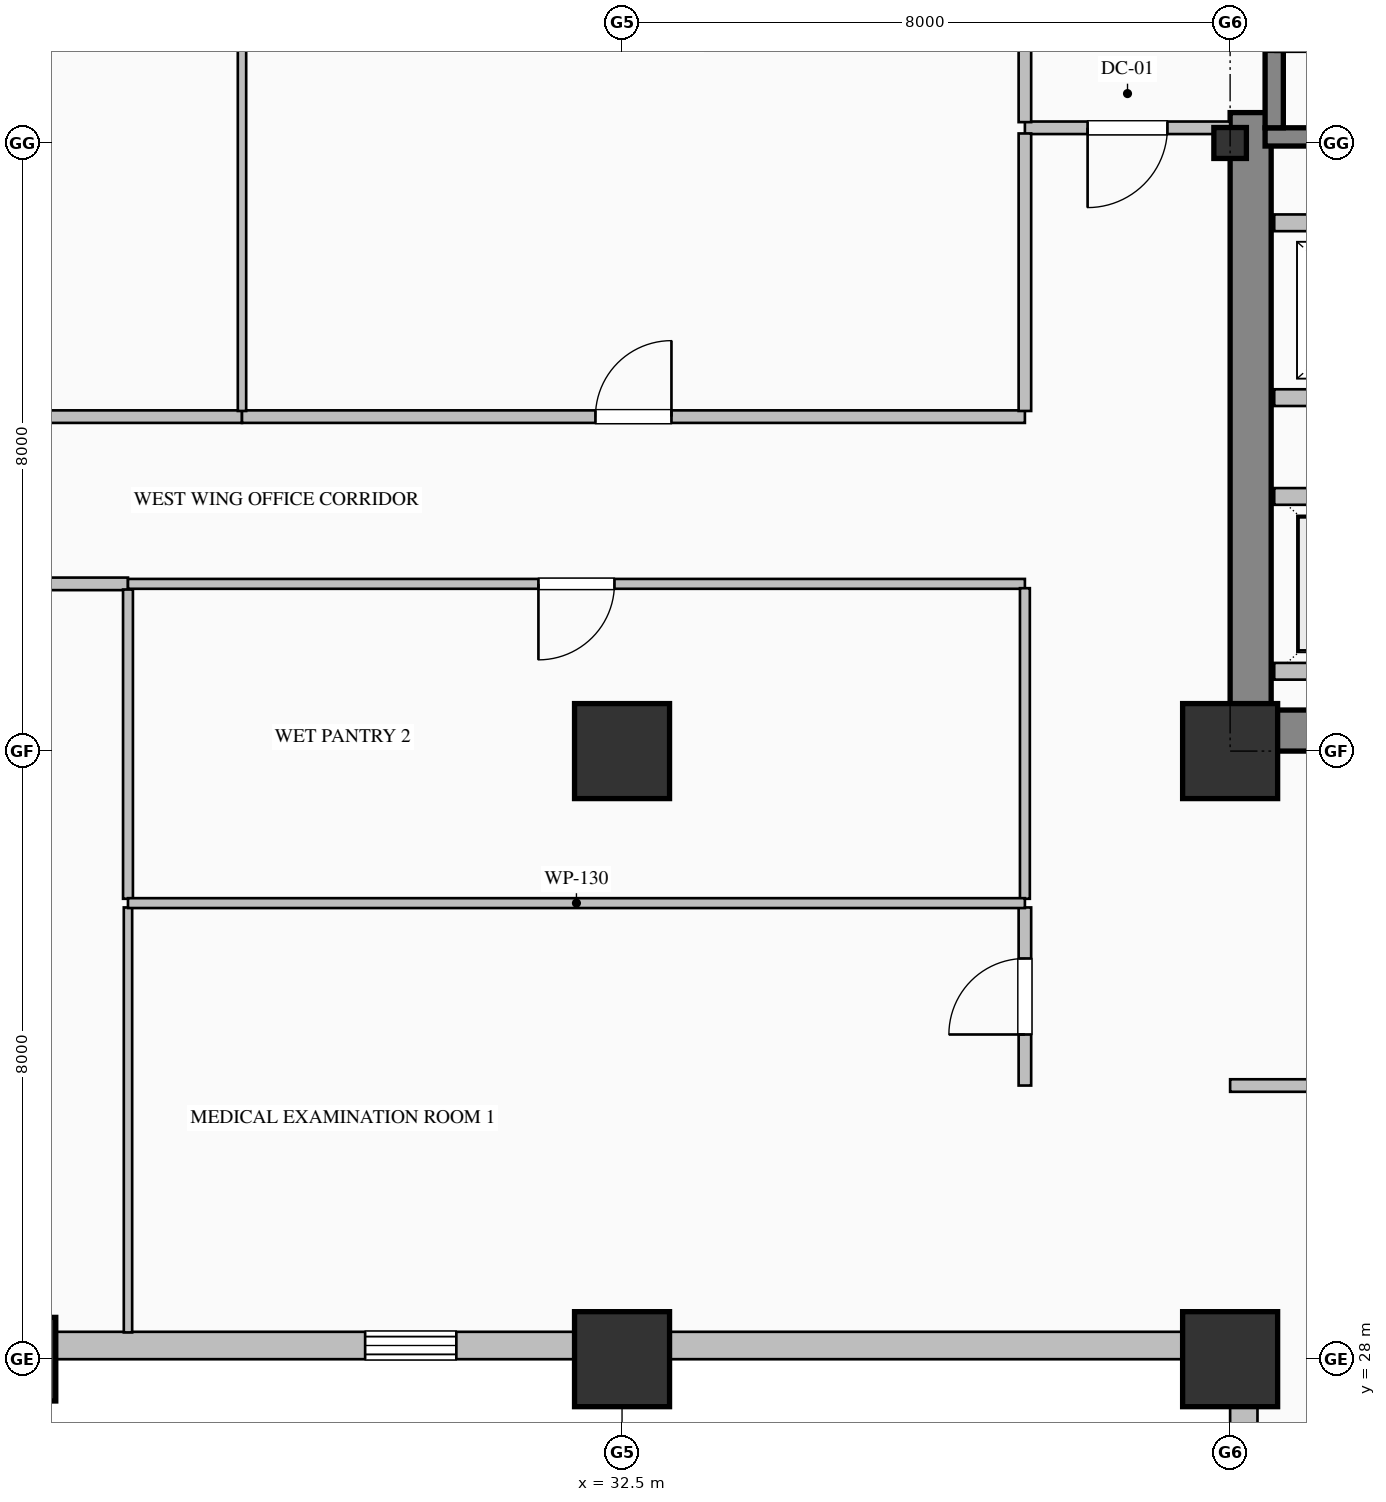
"""IFC4 building model, lengths in metres.
Left out: names, types, materials, properties, quantities, classifications, styles, units other than length and angle.
Written with IfcOpenShell. Run it as: python <this file> out.ifc"""

import sys

from ifc_helpers import new_model, si_unit, direction, frame, frame_2d, origin, origin_2d, place, context, subcontext, project, spatial, rectangle, hollow_rectangle, i_section, extrude, element, fill, save


model = new_model("IFC4")
c1 = context("Model", 3, precision=1e-05, world=origin(), true_north=direction((0.0, 1.0)))
c2 = subcontext(c1, "Body", "Model", "MODEL_VIEW")
j1 = project(units=[si_unit("LENGTHUNIT", "METRE"), si_unit("PLANEANGLEUNIT", "RADIAN")], contexts=[c1])
p1 = place(None, origin())
s1 = spatial("IfcSite", under=j1, at=p1, CompositionType="ELEMENT")
p2 = place(p1, origin())
s2 = spatial("IfcBuilding", under=s1, at=p2, CompositionType="ELEMENT")
p3 = place(p2, frame((0.0, 0.0, 80.2)))
s3 = spatial("IfcBuildingStorey", under=s2, at=p3, CompositionType="ELEMENT", Elevation=80.2)
p4 = place(p3, frame((40.77, 36.54, 0.0), z_axis=(0.0, 0.0, 1.0), x_axis=(0.0, 1.0, 0.0)))
e1 = element("IfcWall", 1, at=p4, inside=s3, PredefinedType="SHEAR", context=c2, shape_type="SweptSolid", body=[
    extrude(rectangle(XDim=7.86, YDim=0.54, at=frame_2d((3.93, 0.0))), origin(), (0.0, 0.0, 1.0), 3.75),
])
p5 = place(p3, frame((40.5, 36.27, 0.0), z_axis=(0.0, 0.0, 1.0), x_axis=(1.0, 0.0, 0.0)))
e2 = element("IfcWall", 2, at=p5, inside=s3, PredefinedType="SHEAR", context=c2, shape_type="SweptSolid", body=[
    extrude(rectangle(XDim=1.7, YDim=0.54, at=frame_2d((0.85, 0.0))), origin(), (0.0, 0.0, 1.0), 3.75),
])
p6 = place(p3, frame((24.5, 28.0, 0.0), z_axis=(0.0, 0.0, 1.0), x_axis=(1.0, 0.0, 0.0)))
e3 = element("IfcColumn", 3, at=p6, inside=s3, PredefinedType="COLUMN", context=c2, shape_type="SweptSolid", body=[
    extrude(hollow_rectangle(XDim=1.1, YDim=1.1, WallThickness=0.04, at=origin_2d()), origin(), (0.0, 0.0, 1.0), 4.0),
])
for number, where, z_axis, x_axis in (
    (4, (32.5, 28.0, 0.0), (0.0, 0.0, 1.0), (1.0, 0.0, 0.0)),
    (5, (32.5, 36.0, 0.0), (0.0, 0.0, 1.0), (1.0, 0.0, 0.0)),
    (6, (40.5, 28.0, 0.0), (0.0, 0.0, 1.0), (1.0, 0.0, 0.0)),
    (7, (40.5, 36.0, 0.0), (0.0, 0.0, 1.0), (1.0, 0.0, 0.0)),
):
    element("IfcColumn", number, at=place(p3, frame(where, z_axis=z_axis, x_axis=x_axis)), inside=s3, PredefinedType="COLUMN", context=c2, shape_type="SweptSolid", body=[
        extrude(hollow_rectangle(XDim=1.25, YDim=1.25, WallThickness=0.045, at=origin_2d()), origin(), (0.0, 0.0, 1.0), 4.0),
    ])
p7 = place(p3, frame((40.5, 44.0, 0.0), z_axis=(0.0, 0.0, 1.0), x_axis=(1.0, 0.0, 0.0)))
e8 = element("IfcColumn", 8, at=p7, inside=s3, PredefinedType="COLUMN", context=c2, shape_type="SweptSolid", body=[
    extrude(i_section(OverallWidth=0.407, OverallDepth=0.428, WebThickness=0.02, FlangeThickness=0.035, FilletRadius=0.022, at=origin_2d()), origin(), (0.0, 0.0, 1.0), 4.0),
])
p8 = place(p3, frame((40.68, 8.0, 0.0), z_axis=(0.0, 0.0, 1.0), x_axis=(0.0, 1.0, 0.0)))
e9 = element("IfcWall", 9, at=p8, inside=s3, PredefinedType="SOLIDWALL", context=c2, shape_type="SweptSolid", body=[
    extrude(rectangle(XDim=20.36, YDim=0.36, at=frame_2d((10.18, 0.0))), origin(), (0.0, 0.0, 1.0), 3.05),
])
p9 = place(p8, frame((6.6, 0.0, 0.7)))
e10 = element("IfcOpeningElement", 10, at=p9, cuts=e9, PredefinedType="OPENING", context=c2, shape_type="SweptSolid", body=[
    extrude(rectangle(XDim=1.2, YDim=1.85, at=frame_2d((0.6, 0.925))), frame((0.0, 0.19, 0.0), z_axis=(0.0, -1.0, 0.0), x_axis=(1.0, 0.0, 0.0)), (0.0, 0.0, 1.0), 0.38),
])
p10 = place(p8, frame((13.8, 0.0, 0.7)))
e11 = element("IfcOpeningElement", 11, at=p10, cuts=e9, PredefinedType="OPENING", context=c2, shape_type="SweptSolid", body=[
    extrude(rectangle(XDim=1.2, YDim=1.85, at=frame_2d((0.6, 0.925))), frame((0.0, 0.19, 0.0), z_axis=(0.0, -1.0, 0.0), x_axis=(1.0, 0.0, 0.0)), (0.0, 0.0, 1.0), 0.38),
])
p11 = place(p3, frame((40.52, 28.18, 0.0), z_axis=(0.0, 0.0, 1.0), x_axis=(-1.0, 0.0, 0.0)))
e12 = element("IfcWall", 12, at=p11, inside=s3, PredefinedType="SOLIDWALL", context=c2, shape_type="SweptSolid", body=[
    extrude(rectangle(XDim=36.52, YDim=0.36, at=frame_2d((18.26, 0.0))), origin(), (0.0, 0.0, 1.0), 3.05),
])
p12 = place(p11, frame((10.2, 0.0, 0.7)))
e13 = element("IfcOpeningElement", 13, at=p12, cuts=e12, PredefinedType="OPENING", context=c2, shape_type="SweptSolid", body=[
    extrude(rectangle(XDim=1.2, YDim=1.85, at=frame_2d((0.6, 0.925))), frame((0.0, 0.19, 0.0), z_axis=(0.0, -1.0, 0.0), x_axis=(1.0, 0.0, 0.0)), (0.0, 0.0, 1.0), 0.38),
])
p13 = place(p11, frame((17.4, 0.0, 0.7)))
e14 = element("IfcOpeningElement", 14, at=p13, cuts=e12, PredefinedType="OPENING", context=c2, shape_type="SweptSolid", body=[
    extrude(rectangle(XDim=1.2, YDim=1.85, at=frame_2d((0.6, 0.925))), frame((0.0, 0.19, 0.0), z_axis=(0.0, -1.0, 0.0), x_axis=(1.0, 0.0, 0.0)), (0.0, 0.0, 1.0), 0.38),
])
p14 = place(p11, frame((21.0, 0.0, 0.7)))
e15 = element("IfcOpeningElement", 15, at=p14, cuts=e12, PredefinedType="OPENING", context=c2, shape_type="SweptSolid", body=[
    extrude(rectangle(XDim=1.2, YDim=1.85, at=frame_2d((0.6, 0.925))), frame((0.0, 0.19, 0.0), z_axis=(0.0, -1.0, 0.0), x_axis=(1.0, 0.0, 0.0)), (0.0, 0.0, 1.0), 0.38),
])
p15 = place(p11, frame((28.2, 0.0, 0.7)))
e16 = element("IfcOpeningElement", 16, at=p15, cuts=e12, PredefinedType="OPENING", context=c2, shape_type="SweptSolid", body=[
    extrude(rectangle(XDim=1.2, YDim=1.85, at=frame_2d((0.6, 0.925))), frame((0.0, 0.19, 0.0), z_axis=(0.0, -1.0, 0.0), x_axis=(1.0, 0.0, 0.0)), (0.0, 0.0, 1.0), 0.38),
])
p16 = place(p3, frame((49.04, 44.08, 0.0), z_axis=(0.0, 0.0, 1.0), x_axis=(-1.0, 0.0, 0.0)))
e17 = element("IfcWall", 17, at=p16, inside=s3, PredefinedType="SOLIDWALL", context=c2, shape_type="SweptSolid", body=[
    extrude(rectangle(XDim=8.08, YDim=0.24, at=frame_2d((4.04, 0.0))), origin(), (0.0, 0.0, 1.0), 4.0),
])
p17 = place(p3, frame((41.08, 47.35, 0.0), z_axis=(0.0, 0.0, 1.0), x_axis=(0.0, -1.0, 0.0)))
e18 = element("IfcWall", 18, at=p17, inside=s3, PredefinedType="SOLIDWALL", context=c2, shape_type="SweptSolid", body=[
    extrude(rectangle(XDim=3.15, YDim=0.24, at=frame_2d((1.575, 0.0))), origin(), (0.0, 0.0, 1.0), 4.0),
])
p18 = place(p17, frame((1.0, 0.0, 0.0)))
e19 = element("IfcOpeningElement", 19, at=p18, cuts=e18, PredefinedType="OPENING", context=c2, shape_type="SweptSolid", body=[
    extrude(rectangle(XDim=1.15, YDim=2.2, at=frame_2d((0.575, 1.1))), frame((0.0, 0.13, 0.0), z_axis=(0.0, -1.0, 0.0), x_axis=(1.0, 0.0, 0.0)), (0.0, 0.0, 1.0), 0.26),
])
p19 = place(p3, frame((49.32, 37.05, 0.0), z_axis=(0.0, 0.0, 1.0), x_axis=(-1.0, 0.0, 0.0)))
e20 = element("IfcWall", 20, at=p19, inside=s3, PredefinedType="PARTITIONING", context=c2, shape_type="SweptSolid", body=[
    extrude(rectangle(XDim=8.24, YDim=0.22, at=frame_2d((4.12, 0.0))), origin(), (0.0, 0.0, 1.0), 3.75),
])
p20 = place(p19, frame((6.37, 0.0, 0.0)))
e21 = element("IfcOpeningElement", 21, at=p20, cuts=e20, PredefinedType="OPENING", context=c2, shape_type="SweptSolid", body=[
    extrude(rectangle(XDim=1.1, YDim=2.2, at=frame_2d((0.55, 1.1))), frame((0.0, 0.12, 0.0), z_axis=(0.0, -1.0, 0.0), x_axis=(1.0, 0.0, 0.0)), (0.0, 0.0, 1.0), 0.24),
])
p21 = place(p19, frame((3.57, 0.0, 0.0)))
e22 = element("IfcOpeningElement", 22, at=p21, cuts=e20, PredefinedType="OPENING", context=c2, shape_type="SweptSolid", body=[
    extrude(rectangle(XDim=1.1, YDim=2.2, at=frame_2d((0.55, 1.1))), frame((0.0, 0.12, 0.0), z_axis=(0.0, -1.0, 0.0), x_axis=(1.0, 0.0, 0.0)), (0.0, 0.0, 1.0), 0.24),
])
p22 = place(p19, frame((0.77, 0.0, 0.0)))
e23 = element("IfcOpeningElement", 23, at=p22, cuts=e20, PredefinedType="OPENING", context=c2, shape_type="SweptSolid", body=[
    extrude(rectangle(XDim=1.1, YDim=2.2, at=frame_2d((0.55, 1.1))), frame((0.0, 0.12, 0.0), z_axis=(0.0, -1.0, 0.0), x_axis=(1.0, 0.0, 0.0)), (0.0, 0.0, 1.0), 0.24),
])
for number, where, z_axis, x_axis in (
    (24, (41.08, 39.35, 0.0), (0.0, 0.0, 1.0), (1.0, 0.0, 0.0)),
    (25, (49.32, 40.65, 0.0), (0.0, 0.0, 1.0), (-1.0, 0.0, 0.0)),
    (26, (41.08, 42.95, 0.0), (0.0, 0.0, 1.0), (1.0, 0.0, 0.0)),
):
    element("IfcWall", number, at=place(p3, frame(where, z_axis=z_axis, x_axis=x_axis)), inside=s3, PredefinedType="PARTITIONING", context=c2, shape_type="SweptSolid", body=[
        extrude(rectangle(XDim=8.24, YDim=0.22, at=frame_2d((4.12, 0.0))), origin(), (0.0, 0.0, 1.0), 3.75),
    ])
p23 = place(p3, frame((40.5, 44.2, 0.0), z_axis=(0.0, 0.0, 1.0), x_axis=(-1.0, 0.0, 0.0)))
e27 = element("IfcWall", 27, at=p23, inside=s3, PredefinedType="PARTITIONING", context=c2, shape_type="SweptSolid", body=[
    extrude(rectangle(XDim=2.7, YDim=0.165, at=frame_2d((1.35, 0.0))), origin(), (0.0, 0.0, 1.0), 3.75),
])
p24 = place(p23, frame((0.825, 0.0, 0.0)))
e28 = element("IfcOpeningElement", 28, at=p24, cuts=e27, PredefinedType="OPENING", context=c2, shape_type="SweptSolid", body=[
    extrude(rectangle(XDim=1.05, YDim=2.15, at=frame_2d((0.525, 1.075))), frame((0.0, 0.093, 0.0), z_axis=(0.0, -1.0, 0.0), x_axis=(1.0, 0.0, 0.0)), (0.0, 0.0, 1.0), 0.185),
])
p25 = place(p3, frame((37.8, 44.274, 0.0), z_axis=(0.0, 0.0, 1.0), x_axis=(0.0, 1.0, 0.0)))
e29 = element("IfcWall", 29, at=p25, inside=s3, PredefinedType="PARTITIONING", context=c2, shape_type="SweptSolid", body=[
    extrude(rectangle(XDim=3.051, YDim=0.165, at=frame_2d((1.525, 0.0))), origin(), (0.0, 0.0, 1.0), 3.75),
])
p26 = place(p3, frame((20.5, 40.4, 0.0), z_axis=(0.0, 0.0, 1.0), x_axis=(1.0, 0.0, 0.0)))
e30 = element("IfcWall", 30, at=p26, inside=s3, PredefinedType="PARTITIONING", context=c2, shape_type="SweptSolid", body=[
    extrude(rectangle(XDim=7.0, YDim=0.165, at=frame_2d((3.5, 0.0))), origin(), (0.0, 0.0, 1.0), 3.75),
])
p27 = place(p26, frame((3.0, 0.0, 0.0)))
e31 = element("IfcOpeningElement", 31, at=p27, cuts=e30, PredefinedType="OPENING", context=c2, shape_type="SweptSolid", body=[
    extrude(rectangle(XDim=1.0, YDim=2.15, at=frame_2d((0.5, 1.075))), frame((0.0, 0.093, 0.0), z_axis=(0.0, -1.0, 0.0), x_axis=(1.0, 0.0, 0.0)), (0.0, 0.0, 1.0), 0.185),
])
p28 = place(p3, frame((27.5, 40.4, 0.0), z_axis=(0.0, 0.0, 1.0), x_axis=(1.0, 0.0, 0.0)))
e32 = element("IfcWall", 32, at=p28, inside=s3, PredefinedType="PARTITIONING", context=c2, shape_type="SweptSolid", body=[
    extrude(rectangle(XDim=10.3, YDim=0.165, at=frame_2d((5.15, 0.0))), origin(), (0.0, 0.0, 1.0), 3.75),
])
p29 = place(p28, frame((4.65, 0.0, 0.0)))
e33 = element("IfcOpeningElement", 33, at=p29, cuts=e32, PredefinedType="OPENING", context=c2, shape_type="SweptSolid", body=[
    extrude(rectangle(XDim=1.0, YDim=2.15, at=frame_2d((0.5, 1.075))), frame((0.0, 0.093, 0.0), z_axis=(0.0, -1.0, 0.0), x_axis=(1.0, 0.0, 0.0)), (0.0, 0.0, 1.0), 0.185),
])
p30 = place(p3, frame((26.0, 38.2, 0.0), z_axis=(0.0, 0.0, 1.0), x_axis=(-1.0, 0.0, 0.0)))
e34 = element("IfcWall", 34, at=p30, inside=s3, PredefinedType="PARTITIONING", context=c2, shape_type="SweptSolid", body=[
    extrude(rectangle(XDim=17.0, YDim=0.165, at=frame_2d((8.5, 0.0))), origin(), (0.0, 0.0, 1.0), 3.75),
])
p31 = place(p30, frame((7.5, 0.0, 0.0)))
e35 = element("IfcOpeningElement", 35, at=p31, cuts=e34, PredefinedType="OPENING", context=c2, shape_type="SweptSolid", body=[
    extrude(rectangle(XDim=2.0, YDim=2.4, at=frame_2d((1.0, 1.2))), frame((0.0, 0.093, 0.0), z_axis=(0.0, -1.0, 0.0), x_axis=(1.0, 0.0, 0.0)), (0.0, 0.0, 1.0), 0.185),
])
p32 = place(p3, frame((37.8, 38.2, 0.0), z_axis=(0.0, 0.0, 1.0), x_axis=(-1.0, 0.0, 0.0)))
e36 = element("IfcWall", 36, at=p32, inside=s3, PredefinedType="PARTITIONING", context=c2, shape_type="SweptSolid", body=[
    extrude(rectangle(XDim=11.8, YDim=0.13, at=frame_2d((5.9, 0.0))), origin(), (0.0, 0.0, 1.0), 3.75),
])
p33 = place(p32, frame((5.4, 0.0, 0.0)))
e37 = element("IfcOpeningElement", 37, at=p33, cuts=e36, PredefinedType="OPENING", context=c2, shape_type="SweptSolid", body=[
    extrude(rectangle(XDim=1.0, YDim=2.15, at=frame_2d((0.5, 1.075))), frame((0.0, 0.075, 0.0), z_axis=(0.0, -1.0, 0.0), x_axis=(1.0, 0.0, 0.0)), (0.0, 0.0, 1.0), 0.15),
])
p34 = place(p3, frame((37.8, 40.475, 0.0), z_axis=(0.0, 0.0, 1.0), x_axis=(0.0, 1.0, 0.0)))
e38 = element("IfcWall", 38, at=p34, inside=s3, PredefinedType="PARTITIONING", context=c2, shape_type="SweptSolid", body=[
    extrude(rectangle(XDim=3.651, YDim=0.165, at=frame_2d((1.825, 0.0))), origin(), (0.0, 0.0, 1.0), 3.75),
])
p35 = place(p3, frame((37.8, 31.6, 0.0), z_axis=(0.0, 0.0, 1.0), x_axis=(0.0, 1.0, 0.0)))
e39 = element("IfcWall", 39, at=p35, inside=s3, PredefinedType="PARTITIONING", context=c2, shape_type="SweptSolid", body=[
    extrude(rectangle(XDim=2.343, YDim=0.165, at=frame_2d((1.171, 0.0))), origin(), (0.0, 0.0, 1.0), 3.75),
])
p36 = place(p35, frame((0.671, 0.0, 0.0)))
e40 = element("IfcOpeningElement", 40, at=p36, cuts=e39, PredefinedType="OPENING", context=c2, shape_type="SweptSolid", body=[
    extrude(rectangle(XDim=1.0, YDim=2.15, at=frame_2d((0.5, 1.075))), frame((0.0, 0.093, 0.0), z_axis=(0.0, -1.0, 0.0), x_axis=(1.0, 0.0, 0.0)), (0.0, 0.0, 1.0), 0.185),
])
p37 = place(p3, frame((37.8, 34.057, 0.0), z_axis=(0.0, 0.0, 1.0), x_axis=(0.0, 1.0, 0.0)))
e41 = element("IfcWall", 41, at=p37, inside=s3, PredefinedType="PARTITIONING", context=c2, shape_type="SweptSolid", body=[
    extrude(rectangle(XDim=4.086, YDim=0.13, at=frame_2d((2.043, 0.0))), origin(), (0.0, 0.0, 1.0), 3.75),
])
p38 = place(p3, frame((43.0, 31.6, 0.0), z_axis=(0.0, 0.0, 1.0), x_axis=(-1.0, 0.0, 0.0)))
e42 = element("IfcWall", 42, at=p38, inside=s3, PredefinedType="PARTITIONING", context=c2, shape_type="SweptSolid", body=[
    extrude(rectangle(XDim=2.5, YDim=0.165, at=frame_2d((1.25, 0.0))), origin(), (0.0, 0.0, 1.0), 3.75),
])
p39 = place(p3, frame((27.5, 51.648, 0.0), z_axis=(0.0, 0.0, 1.0), x_axis=(0.0, -1.0, 0.0)))
e43 = element("IfcWall", 43, at=p39, inside=s3, PredefinedType="MOVABLE", context=c2, shape_type="SweptSolid", body=[
    extrude(rectangle(XDim=11.173, YDim=0.11, at=frame_2d((5.587, 0.0))), origin(), (0.0, 0.0, 1.0), 3.75),
])
p40 = place(p3, frame((26.0, 33.943, 0.0), z_axis=(0.0, 0.0, 1.0), x_axis=(0.0, -1.0, 0.0)))
e44 = element("IfcWall", 44, at=p40, inside=s3, PredefinedType="MOVABLE", context=c2, shape_type="SweptSolid", body=[
    extrude(rectangle(XDim=5.591, YDim=0.11, at=frame_2d((2.795, 0.0))), origin(), (0.0, 0.0, 1.0), 3.75),
])
p41 = place(p3, frame((26.0, 38.125, 0.0), z_axis=(0.0, 0.0, 1.0), x_axis=(0.0, -1.0, 0.0)))
e45 = element("IfcWall", 45, at=p41, inside=s3, PredefinedType="PARTITIONING", context=c2, shape_type="SweptSolid", body=[
    extrude(rectangle(XDim=4.069, YDim=0.13, at=frame_2d((2.034, 0.0))), origin(), (0.0, 0.0, 1.0), 3.75),
])
p42 = place(p3, frame((26.0, 34.0, 0.0), z_axis=(0.0, 0.0, 1.0), x_axis=(1.0, 0.0, 0.0)))
e46 = element("IfcWall", 46, at=p42, inside=s3, PredefinedType="PARTITIONING", context=c2, shape_type="SweptSolid", body=[
    extrude(rectangle(XDim=11.8, YDim=0.13, at=frame_2d((5.9, 0.0))), origin(), (0.0, 0.0, 1.0), 3.75),
])
p43 = place(p12, origin())
e47 = element("IfcWindow", 47, at=p43, inside=s3, PartitioningType="DOUBLE_PANEL_VERTICAL", PredefinedType="WINDOW", context=c2, shape_type="SweptSolid", body=[
    extrude(rectangle(XDim=1.2, YDim=1.85, at=frame_2d((0.6, 0.925))), frame((0.0, 0.15, 0.0), z_axis=(0.0, -1.0, 0.0), x_axis=(1.0, 0.0, 0.0)), (0.0, 0.0, 1.0), 0.06),
])
fill(e13, e47)
p44 = place(p24, origin())
e48 = element("IfcDoor", 48, at=p44, inside=s3, OperationType="SINGLE_SWING_RIGHT", PredefinedType="DOOR", context=c2, shape_type="SweptSolid", body=[
    extrude(rectangle(XDim=1.05, YDim=2.15, at=frame_2d((0.525, 1.075))), frame((0.0, 0.025, 0.0), z_axis=(0.0, -1.0, 0.0), x_axis=(1.0, 0.0, 0.0)), (0.0, 0.0, 1.0), 0.05),
])
fill(e28, e48)
p45 = place(p29, origin())
e49 = element("IfcDoor", 49, at=p45, inside=s3, OperationType="SINGLE_SWING_RIGHT", PredefinedType="DOOR", context=c2, shape_type="SweptSolid", body=[
    extrude(rectangle(XDim=1.0, YDim=2.15, at=frame_2d((0.5, 1.075))), frame((0.0, 0.025, 0.0), z_axis=(0.0, -1.0, 0.0), x_axis=(1.0, 0.0, 0.0)), (0.0, 0.0, 1.0), 0.05),
])
fill(e33, e49)
p46 = place(p36, origin())
e50 = element("IfcDoor", 50, at=p46, inside=s3, OperationType="SINGLE_SWING_LEFT", PredefinedType="DOOR", context=c2, shape_type="SweptSolid", body=[
    extrude(rectangle(XDim=1.0, YDim=2.15, at=frame_2d((0.5, 1.075))), frame((0.0, 0.025, 0.0), z_axis=(0.0, -1.0, 0.0), x_axis=(1.0, 0.0, 0.0)), (0.0, 0.0, 1.0), 0.05),
])
fill(e40, e50)
p47 = place(p33, origin())
e51 = element("IfcDoor", 51, at=p47, inside=s3, OperationType="SINGLE_SWING_RIGHT", PredefinedType="DOOR", context=c2, shape_type="SweptSolid", body=[
    extrude(rectangle(XDim=1.0, YDim=2.15, at=frame_2d((0.5, 1.075))), frame((0.0, 0.025, 0.0), z_axis=(0.0, -1.0, 0.0), x_axis=(1.0, 0.0, 0.0)), (0.0, 0.0, 1.0), 0.05),
])
fill(e37, e51)
save(model, sys.argv[1])
